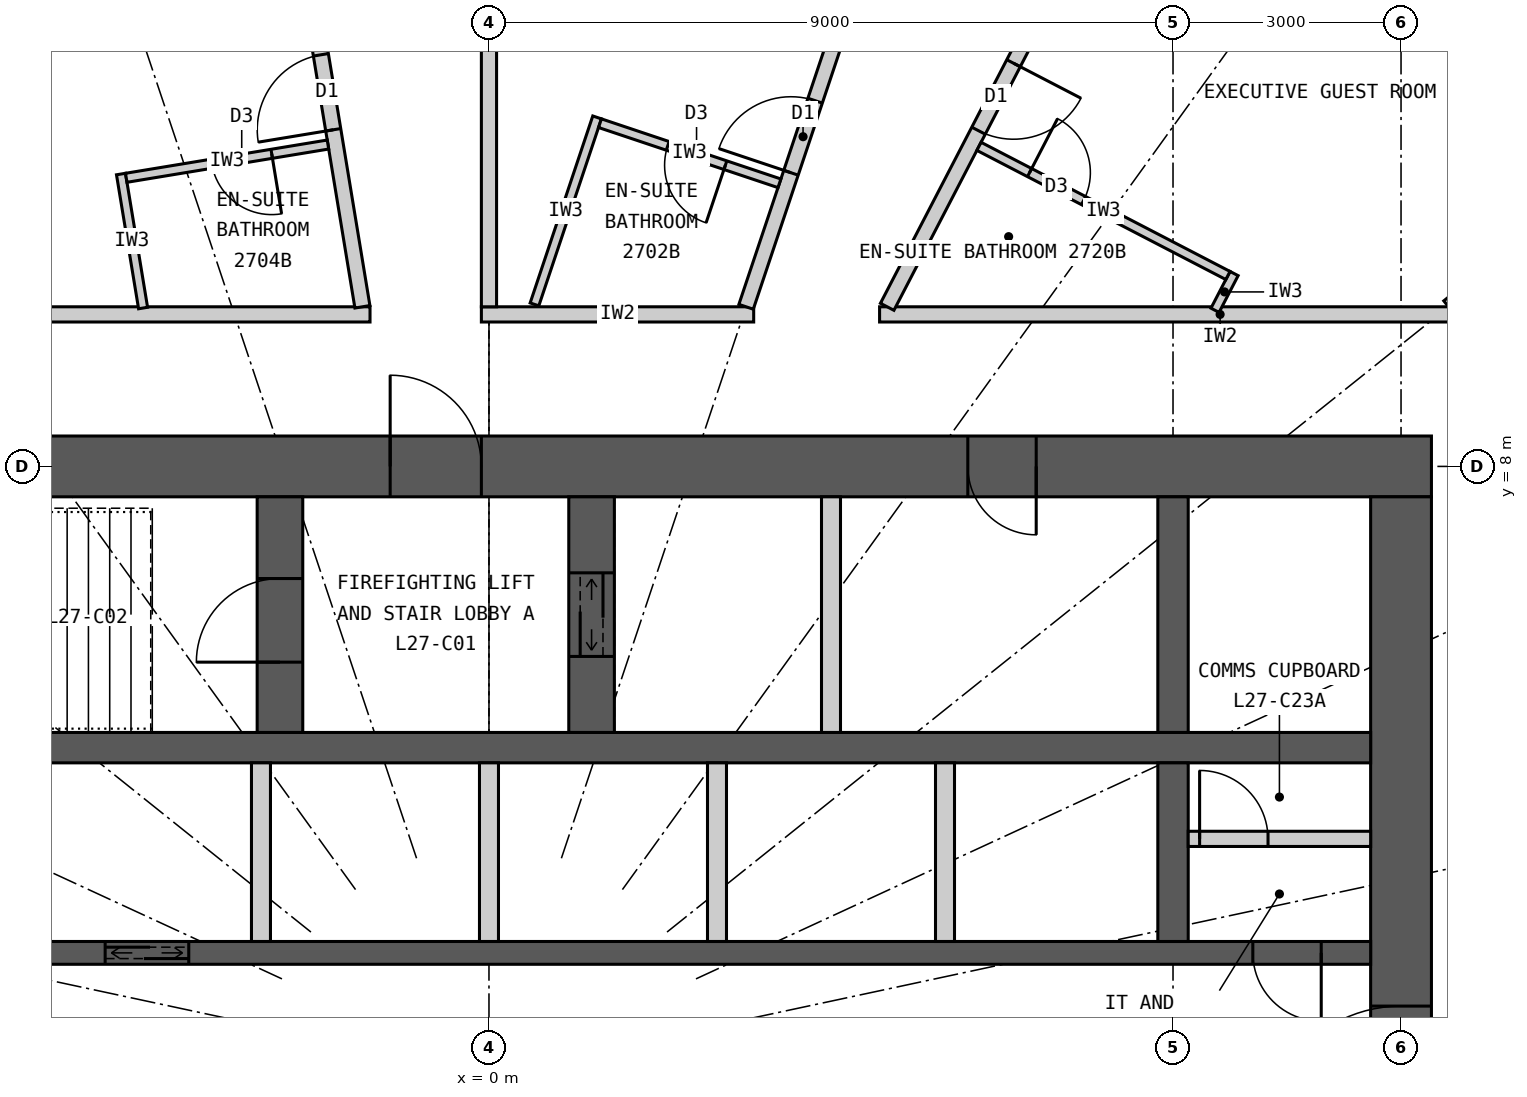
"""IFC4 building model, lengths in metres.
Left out: names, types, materials, properties, quantities, classifications, styles, units other than length and angle.
Written with IfcOpenShell. Run it as: python <this file> out.ifc"""

import sys

from ifc_helpers import new_model, si_unit, direction, frame, frame_2d, origin, place, context, subcontext, project, spatial, rectangle, extrude, element, fill, save


model = new_model("IFC4")
c1 = context("Model", 3, precision=1e-05, world=origin(), true_north=direction((0.0, 1.0)))
c2 = subcontext(c1, "Body", "Model", "MODEL_VIEW")
j1 = project(units=[si_unit("LENGTHUNIT", "METRE"), si_unit("PLANEANGLEUNIT", "RADIAN")], contexts=[c1])
p1 = place(None, origin())
s1 = spatial("IfcSite", under=j1, at=p1, CompositionType="ELEMENT")
p2 = place(p1, origin())
s2 = spatial("IfcBuilding", under=s1, at=p2, CompositionType="ELEMENT")
p3 = place(p2, frame((0.0, 0.0, 108.9)))
s3 = spatial("IfcBuildingStorey", under=s2, at=p3, CompositionType="ELEMENT", Elevation=108.9)
p4 = place(p3, frame((-12.4, 8.0, 0.0), z_axis=(0.0, 0.0, 1.0), x_axis=(1.0, 0.0, 0.0)))
e1 = element("IfcWall", 1, at=p4, inside=s3, PredefinedType="SHEAR", context=c2, shape_type="SweptSolid", body=[
    extrude(rectangle(XDim=24.8, YDim=0.8, at=frame_2d((12.4, 0.0))), origin(), (0.0, 0.0, 1.0), 3.3),
])
p5 = place(p4, frame((11.1, 0.0, 0.0)))
e2 = element("IfcOpeningElement", 2, at=p5, cuts=e1, PredefinedType="OPENING", context=c2, shape_type="SweptSolid", body=[
    extrude(rectangle(XDim=1.2, YDim=2.2, at=frame_2d((0.6, 1.1))), frame((0.0, 0.41, 0.0), z_axis=(0.0, -1.0, 0.0), x_axis=(1.0, 0.0, 0.0)), (0.0, 0.0, 1.0), 0.82),
])
p6 = place(p4, frame((18.7, 0.0, 0.0)))
e3 = element("IfcOpeningElement", 3, at=p6, cuts=e1, PredefinedType="OPENING", context=c2, shape_type="SweptSolid", body=[
    extrude(rectangle(XDim=0.9, YDim=2.2, at=frame_2d((0.45, 1.1))), frame((0.0, 0.41, 0.0), z_axis=(0.0, -1.0, 0.0), x_axis=(1.0, 0.0, 0.0)), (0.0, 0.0, 1.0), 0.82),
])
p7 = place(p3, frame((12.0, -7.6, 0.0), z_axis=(0.0, 0.0, 1.0), x_axis=(0.0, 1.0, 0.0)))
e4 = element("IfcWall", 4, at=p7, inside=s3, PredefinedType="SHEAR", context=c2, shape_type="SweptSolid", body=[
    extrude(rectangle(XDim=15.2, YDim=0.8, at=frame_2d((7.6, 0.0))), origin(), (0.0, 0.0, 1.0), 3.3),
])
p8 = place(p7, frame((6.7, 0.0, 0.0)))
e5 = element("IfcOpeningElement", 5, at=p8, cuts=e4, PredefinedType="OPENING", context=c2, shape_type="SweptSolid", body=[
    extrude(rectangle(XDim=1.8, YDim=2.2, at=frame_2d((0.9, 1.1))), frame((0.0, 0.41, 0.0), z_axis=(0.0, -1.0, 0.0), x_axis=(1.0, 0.0, 0.0)), (0.0, 0.0, 1.0), 0.82),
])
p9 = place(p3, frame((-11.6, 4.3, 0.0), z_axis=(0.0, 0.0, 1.0), x_axis=(1.0, 0.0, 0.0)))
e6 = element("IfcWall", 6, at=p9, inside=s3, PredefinedType="SHEAR", context=c2, shape_type="SweptSolid", body=[
    extrude(rectangle(XDim=23.2, YDim=0.4, at=frame_2d((11.6, 0.0))), origin(), (0.0, 0.0, 1.0), 3.3),
])
p10 = place(p3, frame((-11.6, 1.6, 0.0), z_axis=(0.0, 0.0, 1.0), x_axis=(1.0, 0.0, 0.0)))
e7 = element("IfcWall", 7, at=p10, inside=s3, PredefinedType="SHEAR", context=c2, shape_type="SweptSolid", body=[
    extrude(rectangle(XDim=23.2, YDim=0.3, at=frame_2d((11.6, 0.0))), origin(), (0.0, 0.0, 1.0), 3.3),
])
p11 = place(p10, frame((6.55, 0.0, 0.0)))
e8 = element("IfcOpeningElement", 8, at=p11, cuts=e7, PredefinedType="OPENING", context=c2, shape_type="SweptSolid", body=[
    extrude(rectangle(XDim=1.1, YDim=2.2, at=frame_2d((0.55, 1.1))), frame((0.0, 0.16, 0.0), z_axis=(0.0, -1.0, 0.0), x_axis=(1.0, 0.0, 0.0)), (0.0, 0.0, 1.0), 0.32),
])
p12 = place(p10, frame((0.65, 0.0, 0.0)))
e9 = element("IfcOpeningElement", 9, at=p12, cuts=e7, PredefinedType="OPENING", context=c2, shape_type="SweptSolid", body=[
    extrude(rectangle(XDim=0.9, YDim=2.2, at=frame_2d((0.45, 1.1))), frame((0.0, 0.16, 0.0), z_axis=(0.0, -1.0, 0.0), x_axis=(1.0, 0.0, 0.0)), (0.0, 0.0, 1.0), 0.32),
])
p13 = place(p10, frame((3.65, 0.0, 0.0)))
e10 = element("IfcOpeningElement", 10, at=p13, cuts=e7, PredefinedType="OPENING", context=c2, shape_type="SweptSolid", body=[
    extrude(rectangle(XDim=0.9, YDim=2.2, at=frame_2d((0.45, 1.1))), frame((0.0, 0.16, 0.0), z_axis=(0.0, -1.0, 0.0), x_axis=(1.0, 0.0, 0.0)), (0.0, 0.0, 1.0), 0.32),
])
p14 = place(p10, frame((21.65, 0.0, 0.0)))
e11 = element("IfcOpeningElement", 11, at=p14, cuts=e7, PredefinedType="OPENING", context=c2, shape_type="SweptSolid", body=[
    extrude(rectangle(XDim=0.9, YDim=2.2, at=frame_2d((0.45, 1.1))), frame((0.0, 0.16, 0.0), z_axis=(0.0, -1.0, 0.0), x_axis=(1.0, 0.0, 0.0)), (0.0, 0.0, 1.0), 0.32),
])
p15 = place(p3, frame((9.0, 4.5, 0.0), z_axis=(0.0, 0.0, 1.0), x_axis=(0.0, 1.0, 0.0)))
e12 = element("IfcWall", 12, at=p15, inside=s3, PredefinedType="SHEAR", context=c2, shape_type="SweptSolid", body=[
    extrude(rectangle(XDim=3.1, YDim=0.4, at=frame_2d((1.55, 0.0))), origin(), (0.0, 0.0, 1.0), 3.3),
])
p16 = place(p3, frame((9.0, 1.75, 0.0), z_axis=(0.0, 0.0, 1.0), x_axis=(0.0, 1.0, 0.0)))
e13 = element("IfcWall", 13, at=p16, inside=s3, PredefinedType="SHEAR", context=c2, shape_type="SweptSolid", body=[
    extrude(rectangle(XDim=2.35, YDim=0.4, at=frame_2d((1.175, 0.0))), origin(), (0.0, 0.0, 1.0), 3.3),
])
p17 = place(p3, frame((-2.75, 4.5, 0.0), z_axis=(0.0, 0.0, 1.0), x_axis=(0.0, 1.0, 0.0)))
e14 = element("IfcWall", 14, at=p17, inside=s3, PredefinedType="SHEAR", context=c2, shape_type="SweptSolid", body=[
    extrude(rectangle(XDim=3.1, YDim=0.6, at=frame_2d((1.55, 0.0))), origin(), (0.0, 0.0, 1.0), 3.3),
])
p18 = place(p17, frame((0.925, 0.0, 0.0)))
e15 = element("IfcOpeningElement", 15, at=p18, cuts=e14, PredefinedType="OPENING", context=c2, shape_type="SweptSolid", body=[
    extrude(rectangle(XDim=1.1, YDim=2.2, at=frame_2d((0.55, 1.1))), frame((0.0, 0.31, 0.0), z_axis=(0.0, -1.0, 0.0), x_axis=(1.0, 0.0, 0.0)), (0.0, 0.0, 1.0), 0.62),
])
p19 = place(p3, frame((1.35, 4.5, 0.0), z_axis=(0.0, 0.0, 1.0), x_axis=(0.0, 1.0, 0.0)))
e16 = element("IfcWall", 16, at=p19, inside=s3, PredefinedType="SHEAR", context=c2, shape_type="SweptSolid", body=[
    extrude(rectangle(XDim=3.1, YDim=0.6, at=frame_2d((1.55, 0.0))), origin(), (0.0, 0.0, 1.0), 3.3),
])
p20 = place(p19, frame((1.0, 0.0, 0.0)))
e17 = element("IfcOpeningElement", 17, at=p20, cuts=e16, PredefinedType="OPENING", context=c2, shape_type="SweptSolid", body=[
    extrude(rectangle(XDim=1.1, YDim=2.2, at=frame_2d((0.55, 1.1))), frame((0.0, 0.31, 0.0), z_axis=(0.0, -1.0, 0.0), x_axis=(1.0, 0.0, 0.0)), (0.0, 0.0, 1.0), 0.62),
])
p21 = place(p3, frame((4.5, 4.5, 0.0), z_axis=(0.0, 0.0, 1.0), x_axis=(0.0, 1.0, 0.0)))
e18 = element("IfcWall", 18, at=p21, inside=s3, PredefinedType="PARTITIONING", context=c2, shape_type="SweptSolid", body=[
    extrude(rectangle(XDim=3.1, YDim=0.25, at=frame_2d((1.55, 0.0))), origin(), (0.0, 0.0, 1.0), 3.3),
])
for number, where, z_axis, x_axis in (
    (19, (-3.0, 1.75, 0.0), (0.0, 0.0, 1.0), (0.0, 1.0, 0.0)),
    (20, (0.0, 1.75, 0.0), (0.0, 0.0, 1.0), (0.0, 1.0, 0.0)),
    (21, (3.0, 1.75, 0.0), (0.0, 0.0, 1.0), (0.0, 1.0, 0.0)),
    (22, (6.0, 1.75, 0.0), (0.0, 0.0, 1.0), (0.0, 1.0, 0.0)),
):
    element("IfcWall", number, at=place(p3, frame(where, z_axis=z_axis, x_axis=x_axis)), inside=s3, PredefinedType="PARTITIONING", context=c2, shape_type="SweptSolid", body=[
        extrude(rectangle(XDim=2.35, YDim=0.25, at=frame_2d((1.175, 0.0))), origin(), (0.0, 0.0, 1.0), 3.3),
    ])
p22 = place(p3, frame((-14.1, 10.0, 0.0), z_axis=(0.0, 0.0, 1.0), x_axis=(1.0, 0.0, 0.0)))
e23 = element("IfcWall", 23, at=p22, inside=s3, PredefinedType="PARTITIONING", context=c2, shape_type="SweptSolid", body=[
    extrude(rectangle(XDim=12.535, YDim=0.2, at=frame_2d((6.268, 0.0))), origin(), (0.0, 0.0, 1.0), 3.12),
])
p23 = place(p22, frame((2.801, 0.0, 0.0)))
e24 = element("IfcOpeningElement", 24, at=p23, cuts=e23, PredefinedType="OPENING", context=c2, shape_type="SweptSolid", body=[
    extrude(rectangle(XDim=1.0, YDim=2.2, at=frame_2d((0.5, 1.1))), frame((0.0, 0.11, 0.0), z_axis=(0.0, -1.0, 0.0), x_axis=(1.0, 0.0, 0.0)), (0.0, 0.0, 1.0), 0.22),
])
p24 = place(p3, frame((-0.1, 10.0, 0.0), z_axis=(0.0, 0.0, 1.0), x_axis=(1.0, 0.0, 0.0)))
e25 = element("IfcWall", 25, at=p24, inside=s3, PredefinedType="PARTITIONING", context=c2, shape_type="SweptSolid", body=[
    extrude(rectangle(XDim=3.583, YDim=0.2, at=frame_2d((1.792, 0.0))), origin(), (0.0, 0.0, 1.0), 3.12),
])
p25 = place(p3, frame((5.139, 10.0, 0.0), z_axis=(0.0, 0.0, 1.0), x_axis=(1.0, 0.0, 0.0)))
e26 = element("IfcWall", 26, at=p25, inside=s3, PredefinedType="PARTITIONING", context=c2, shape_type="SweptSolid", body=[
    extrude(rectangle(XDim=8.961, YDim=0.2, at=frame_2d((4.48, 0.0))), origin(), (0.0, 0.0, 1.0), 3.12),
])
p26 = place(p3, frame((12.625, 10.1, 0.0), z_axis=(0.0, 0.0, 1.0), x_axis=(0.780863644897, 0.624701503182, 0.0)))
e27 = element("IfcWall", 27, at=p26, inside=s3, PredefinedType="PARTITIONING", context=c2, shape_type="SweptSolid", body=[
    extrude(rectangle(XDim=4.612, YDim=0.2, at=frame_2d((2.306, 0.0))), origin(), (0.0, 0.0, 1.0), 2.37),
])
p27 = place(p3, frame((5.239, 10.1, 0.0), z_axis=(0.0, 0.0, 1.0), x_axis=(0.4604797896, 0.887670188398, 0.0)))
e28 = element("IfcWall", 28, at=p27, inside=s3, PredefinedType="PARTITIONING", context=c2, shape_type="SweptSolid", body=[
    extrude(rectangle(XDim=8.676, YDim=0.2, at=frame_2d((4.338, 0.0))), origin(), (0.0, 0.0, 1.0), 3.12),
])
p28 = place(p27, frame((2.61, 0.0, 0.0)))
e29 = element("IfcOpeningElement", 29, at=p28, cuts=e28, PredefinedType="OPENING", context=c2, shape_type="SweptSolid", body=[
    extrude(rectangle(XDim=1.0, YDim=2.2, at=frame_2d((0.5, 1.1))), frame((0.0, 0.11, 0.0), z_axis=(0.0, -1.0, 0.0), x_axis=(1.0, 0.0, 0.0)), (0.0, 0.0, 1.0), 0.22),
])
p29 = place(p3, frame((3.383, 10.1, 0.0), z_axis=(0.0, 0.0, 1.0), x_axis=(0.317603705574, 0.948223542318, 0.0)))
e30 = element("IfcWall", 30, at=p29, inside=s3, PredefinedType="PARTITIONING", context=c2, shape_type="SweptSolid", body=[
    extrude(rectangle(XDim=7.823, YDim=0.2, at=frame_2d((3.912, 0.0))), origin(), (0.0, 0.0, 1.0), 2.37),
])
p30 = place(p29, frame((1.86, 0.0, 0.0)))
e31 = element("IfcOpeningElement", 31, at=p30, cuts=e30, PredefinedType="OPENING", context=c2, shape_type="SweptSolid", body=[
    extrude(rectangle(XDim=1.0, YDim=2.2, at=frame_2d((0.5, 1.1))), frame((0.0, 0.11, 0.0), z_axis=(0.0, -1.0, 0.0), x_axis=(1.0, 0.0, 0.0)), (0.0, 0.0, 1.0), 0.22),
])
p31 = place(p3, frame((0.0, 10.1, 0.0), z_axis=(0.0, 0.0, 1.0), x_axis=(0.0, 1.0, 0.0)))
e32 = element("IfcWall", 32, at=p31, inside=s3, PredefinedType="PARTITIONING", context=c2, shape_type="SweptSolid", body=[
    extrude(rectangle(XDim=8.0, YDim=0.2, at=frame_2d((4.0, 0.0))), origin(), (0.0, 0.0, 1.0), 2.37),
])
p32 = place(p3, frame((-1.665, 10.1, 0.0), z_axis=(0.0, 0.0, 1.0), x_axis=(-0.162660519103, 0.986682094459, 0.0)))
e33 = element("IfcWall", 33, at=p32, inside=s3, PredefinedType="PARTITIONING", context=c2, shape_type="SweptSolid", body=[
    extrude(rectangle(XDim=9.111, YDim=0.2, at=frame_2d((4.555, 0.0))), origin(), (0.0, 0.0, 1.0), 3.12),
])
p33 = place(p32, frame((2.36, 0.0, 0.0)))
e34 = element("IfcOpeningElement", 34, at=p33, cuts=e33, PredefinedType="OPENING", context=c2, shape_type="SweptSolid", body=[
    extrude(rectangle(XDim=1.0, YDim=2.2, at=frame_2d((0.5, 1.1))), frame((0.0, 0.11, 0.0), z_axis=(0.0, -1.0, 0.0), x_axis=(1.0, 0.0, 0.0)), (0.0, 0.0, 1.0), 0.22),
])
p34 = place(p3, frame((0.599, 10.132, 0.0), z_axis=(0.0, 0.0, 1.0), x_axis=(0.317554522053, 0.948240014724, 0.0)))
e35 = element("IfcWall", 35, at=p34, inside=s3, PredefinedType="PARTITIONING", context=c2, shape_type="SweptSolid", body=[
    extrude(rectangle(XDim=2.594, YDim=0.12, at=frame_2d((1.297, 0.0))), origin(), (0.0, 0.0, 1.0), 3.12),
])
p35 = place(p3, frame((3.822, 11.725, 0.0), z_axis=(0.0, 0.0, 1.0), x_axis=(-0.948231307998, 0.317580519761, 0.0)))
e36 = element("IfcWall", 36, at=p35, inside=s3, PredefinedType="PARTITIONING", context=c2, shape_type="SweptSolid", body=[
    extrude(rectangle(XDim=2.49, YDim=0.12, at=frame_2d((1.245, 0.0))), origin(), (0.0, 0.0, 1.0), 3.12),
])
p36 = place(p35, frame((0.75, 0.0, 0.0)))
e37 = element("IfcOpeningElement", 37, at=p36, cuts=e36, PredefinedType="OPENING", context=c2, shape_type="SweptSolid", body=[
    extrude(rectangle(XDim=0.8, YDim=2.1, at=frame_2d((0.4, 1.05))), frame((0.0, 0.07, 0.0), z_axis=(0.0, -1.0, 0.0), x_axis=(1.0, 0.0, 0.0)), (0.0, 0.0, 1.0), 0.14),
])
p37 = place(p3, frame((-4.551, 10.084, 0.0), z_axis=(0.0, 0.0, 1.0), x_axis=(-0.162625830583, 0.986687812445, 0.0)))
e38 = element("IfcWall", 38, at=p37, inside=s3, PredefinedType="PARTITIONING", context=c2, shape_type="SweptSolid", body=[
    extrude(rectangle(XDim=1.786, YDim=0.12, at=frame_2d((0.893, 0.0))), origin(), (0.0, 0.0, 1.0), 3.12),
])
p38 = place(p3, frame((-2.118, 12.235, 0.0), z_axis=(0.0, 0.0, 1.0), x_axis=(-0.986686682911, -0.16263268357, 0.0)))
e39 = element("IfcWall", 39, at=p38, inside=s3, PredefinedType="PARTITIONING", context=c2, shape_type="SweptSolid", body=[
    extrude(rectangle(XDim=2.69, YDim=0.12, at=frame_2d((1.345, 0.0))), origin(), (0.0, 0.0, 1.0), 3.12),
])
p39 = place(p38, frame((0.75, 0.0, 0.0)))
e40 = element("IfcOpeningElement", 40, at=p39, cuts=e39, PredefinedType="OPENING", context=c2, shape_type="SweptSolid", body=[
    extrude(rectangle(XDim=0.8, YDim=2.1, at=frame_2d((0.4, 1.05))), frame((0.0, 0.07, 0.0), z_axis=(0.0, -1.0, 0.0), x_axis=(1.0, 0.0, 0.0)), (0.0, 0.0, 1.0), 0.14),
])
p40 = place(p3, frame((9.552, 10.054, 0.0), z_axis=(0.0, 0.0, 1.0), x_axis=(0.460604866949, 0.887605293215, 0.0)))
e41 = element("IfcWall", 41, at=p40, inside=s3, PredefinedType="PARTITIONING", context=c2, shape_type="SweptSolid", body=[
    extrude(rectangle(XDim=0.545, YDim=0.12, at=frame_2d((0.272, 0.0))), origin(), (0.0, 0.0, 1.0), 3.12),
])
p41 = place(p3, frame((6.447, 12.211, 0.0), z_axis=(0.0, 0.0, 1.0), x_axis=(0.887685422499, -0.460450421525, 0.0)))
e42 = element("IfcWall", 42, at=p41, inside=s3, PredefinedType="PARTITIONING", context=c2, shape_type="SweptSolid", body=[
    extrude(rectangle(XDim=3.69, YDim=0.12, at=frame_2d((1.845, 0.0))), origin(), (0.0, 0.0, 1.0), 3.12),
])
p42 = place(p41, frame((0.75, 0.0, 0.0)))
e43 = element("IfcOpeningElement", 43, at=p42, cuts=e42, PredefinedType="OPENING", context=c2, shape_type="SweptSolid", body=[
    extrude(rectangle(XDim=0.8, YDim=2.1, at=frame_2d((0.4, 1.05))), frame((0.0, 0.07, 0.0), z_axis=(0.0, -1.0, 0.0), x_axis=(1.0, 0.0, 0.0)), (0.0, 0.0, 1.0), 0.14),
])
p43 = place(p3, frame((9.2, 3.1, 0.0), z_axis=(0.0, 0.0, 1.0), x_axis=(1.0, 0.0, 0.0)))
e44 = element("IfcWall", 44, at=p43, inside=s3, PredefinedType="PARTITIONING", context=c2, shape_type="SweptSolid", body=[
    extrude(rectangle(XDim=2.4, YDim=0.2, at=frame_2d((1.2, 0.0))), origin(), (0.0, 0.0, 1.0), 3.12),
])
p44 = place(p43, frame((0.15, 0.0, 0.0)))
e45 = element("IfcOpeningElement", 45, at=p44, cuts=e44, PredefinedType="OPENING", context=c2, shape_type="SweptSolid", body=[
    extrude(rectangle(XDim=0.9, YDim=2.2, at=frame_2d((0.45, 1.1))), frame((0.0, 0.11, 0.0), z_axis=(0.0, -1.0, 0.0), x_axis=(1.0, 0.0, 0.0)), (0.0, 0.0, 1.0), 0.22),
])
p45 = place(p36, origin())
e46 = element("IfcDoor", 46, at=p45, inside=s3, OperationType="SINGLE_SWING_LEFT", PredefinedType="DOOR", context=c2, shape_type="SweptSolid", body=[
    extrude(rectangle(XDim=0.8, YDim=2.1, at=frame_2d((0.4, 1.05))), frame((0.0, 0.025, 0.0), z_axis=(0.0, -1.0, 0.0), x_axis=(1.0, 0.0, 0.0)), (0.0, 0.0, 1.0), 0.05),
])
fill(e37, e46)
p46 = place(p30, origin())
e47 = element("IfcDoor", 47, at=p46, inside=s3, OperationType="SINGLE_SWING_LEFT", PredefinedType="DOOR", context=c2, shape_type="SweptSolid", body=[
    extrude(rectangle(XDim=1.0, YDim=2.2, at=frame_2d((0.5, 1.1))), frame((0.0, 0.025, 0.0), z_axis=(0.0, -1.0, 0.0), x_axis=(1.0, 0.0, 0.0)), (0.0, 0.0, 1.0), 0.05),
])
fill(e31, e47)
p47 = place(p39, origin())
e48 = element("IfcDoor", 48, at=p47, inside=s3, OperationType="SINGLE_SWING_LEFT", PredefinedType="DOOR", context=c2, shape_type="SweptSolid", body=[
    extrude(rectangle(XDim=0.8, YDim=2.1, at=frame_2d((0.4, 1.05))), frame((0.0, 0.025, 0.0), z_axis=(0.0, -1.0, 0.0), x_axis=(1.0, 0.0, 0.0)), (0.0, 0.0, 1.0), 0.05),
])
fill(e40, e48)
p48 = place(p33, origin())
e49 = element("IfcDoor", 49, at=p48, inside=s3, OperationType="SINGLE_SWING_LEFT", PredefinedType="DOOR", context=c2, shape_type="SweptSolid", body=[
    extrude(rectangle(XDim=1.0, YDim=2.2, at=frame_2d((0.5, 1.1))), frame((0.0, 0.025, 0.0), z_axis=(0.0, -1.0, 0.0), x_axis=(1.0, 0.0, 0.0)), (0.0, 0.0, 1.0), 0.05),
])
fill(e34, e49)
p49 = place(p42, origin())
e50 = element("IfcDoor", 50, at=p49, inside=s3, OperationType="SINGLE_SWING_LEFT", PredefinedType="DOOR", context=c2, shape_type="SweptSolid", body=[
    extrude(rectangle(XDim=0.8, YDim=2.1, at=frame_2d((0.4, 1.05))), frame((0.0, 0.025, 0.0), z_axis=(0.0, -1.0, 0.0), x_axis=(1.0, 0.0, 0.0)), (0.0, 0.0, 1.0), 0.05),
])
fill(e43, e50)
p50 = place(p28, origin())
e51 = element("IfcDoor", 51, at=p50, inside=s3, OperationType="SINGLE_SWING_RIGHT", PredefinedType="DOOR", context=c2, shape_type="SweptSolid", body=[
    extrude(rectangle(XDim=1.0, YDim=2.2, at=frame_2d((0.5, 1.1))), frame((0.0, 0.025, 0.0), z_axis=(0.0, -1.0, 0.0), x_axis=(1.0, 0.0, 0.0)), (0.0, 0.0, 1.0), 0.05),
])
fill(e29, e51)
p51 = place(p5, origin())
e52 = element("IfcDoor", 52, at=p51, inside=s3, OperationType="SINGLE_SWING_LEFT", PredefinedType="DOOR", context=c2, shape_type="SweptSolid", body=[
    extrude(rectangle(XDim=1.2, YDim=2.2, at=frame_2d((0.6, 1.1))), frame((0.0, 0.025, 0.0), z_axis=(0.0, -1.0, 0.0), x_axis=(1.0, 0.0, 0.0)), (0.0, 0.0, 1.0), 0.05),
])
fill(e2, e52)
p52 = place(p18, origin())
e53 = element("IfcDoor", 53, at=p52, inside=s3, OperationType="SINGLE_SWING_LEFT", PredefinedType="DOOR", context=c2, shape_type="SweptSolid", body=[
    extrude(rectangle(XDim=1.1, YDim=2.2, at=frame_2d((0.55, 1.1))), frame((0.0, 0.025, 0.0), z_axis=(0.0, -1.0, 0.0), x_axis=(1.0, 0.0, 0.0)), (0.0, 0.0, 1.0), 0.05),
])
fill(e15, e53)
p53 = place(p20, origin())
e54 = element("IfcDoor", 54, at=p53, inside=s3, OperationType="DOUBLE_DOOR_SLIDING", PredefinedType="DOOR", context=c2, shape_type="SweptSolid", body=[
    extrude(rectangle(XDim=1.1, YDim=2.2, at=frame_2d((0.55, 1.1))), frame((0.0, 0.025, 0.0), z_axis=(0.0, -1.0, 0.0), x_axis=(1.0, 0.0, 0.0)), (0.0, 0.0, 1.0), 0.05),
])
fill(e17, e54)
p54 = place(p6, origin())
e55 = element("IfcDoor", 55, at=p54, inside=s3, OperationType="SINGLE_SWING_RIGHT", PredefinedType="DOOR", context=c2, shape_type="SweptSolid", body=[
    extrude(rectangle(XDim=0.9, YDim=2.2, at=frame_2d((0.45, 1.1))), frame((0.0, 0.025, 0.0), z_axis=(0.0, -1.0, 0.0), x_axis=(1.0, 0.0, 0.0)), (0.0, 0.0, 1.0), 0.05),
])
fill(e3, e55)
p55 = place(p11, origin())
e56 = element("IfcDoor", 56, at=p55, inside=s3, OperationType="DOUBLE_DOOR_SLIDING", PredefinedType="DOOR", context=c2, shape_type="SweptSolid", body=[
    extrude(rectangle(XDim=1.1, YDim=2.2, at=frame_2d((0.55, 1.1))), frame((0.0, 0.025, 0.0), z_axis=(0.0, -1.0, 0.0), x_axis=(1.0, 0.0, 0.0)), (0.0, 0.0, 1.0), 0.05),
])
fill(e8, e56)
p56 = place(p44, origin())
e57 = element("IfcDoor", 57, at=p56, inside=s3, OperationType="SINGLE_SWING_LEFT", PredefinedType="DOOR", context=c2, shape_type="SweptSolid", body=[
    extrude(rectangle(XDim=0.9, YDim=2.2, at=frame_2d((0.45, 1.1))), frame((0.0, 0.025, 0.0), z_axis=(0.0, -1.0, 0.0), x_axis=(1.0, 0.0, 0.0)), (0.0, 0.0, 1.0), 0.05),
])
fill(e45, e57)
p57 = place(p14, origin())
e58 = element("IfcDoor", 58, at=p57, inside=s3, OperationType="SINGLE_SWING_RIGHT", PredefinedType="DOOR", context=c2, shape_type="SweptSolid", body=[
    extrude(rectangle(XDim=0.9, YDim=2.2, at=frame_2d((0.45, 1.1))), frame((0.0, 0.025, 0.0), z_axis=(0.0, -1.0, 0.0), x_axis=(1.0, 0.0, 0.0)), (0.0, 0.0, 1.0), 0.05),
])
fill(e11, e58)
p58 = place(p8, origin())
e59 = element("IfcDoor", 59, at=p58, inside=s3, OperationType="DOUBLE_DOOR_DOUBLE_SWING", PredefinedType="DOOR", context=c2, shape_type="SweptSolid", body=[
    extrude(rectangle(XDim=1.8, YDim=2.2, at=frame_2d((0.9, 1.1))), frame((0.0, 0.025, 0.0), z_axis=(0.0, -1.0, 0.0), x_axis=(1.0, 0.0, 0.0)), (0.0, 0.0, 1.0), 0.05),
])
fill(e5, e59)
save(model, sys.argv[1])
